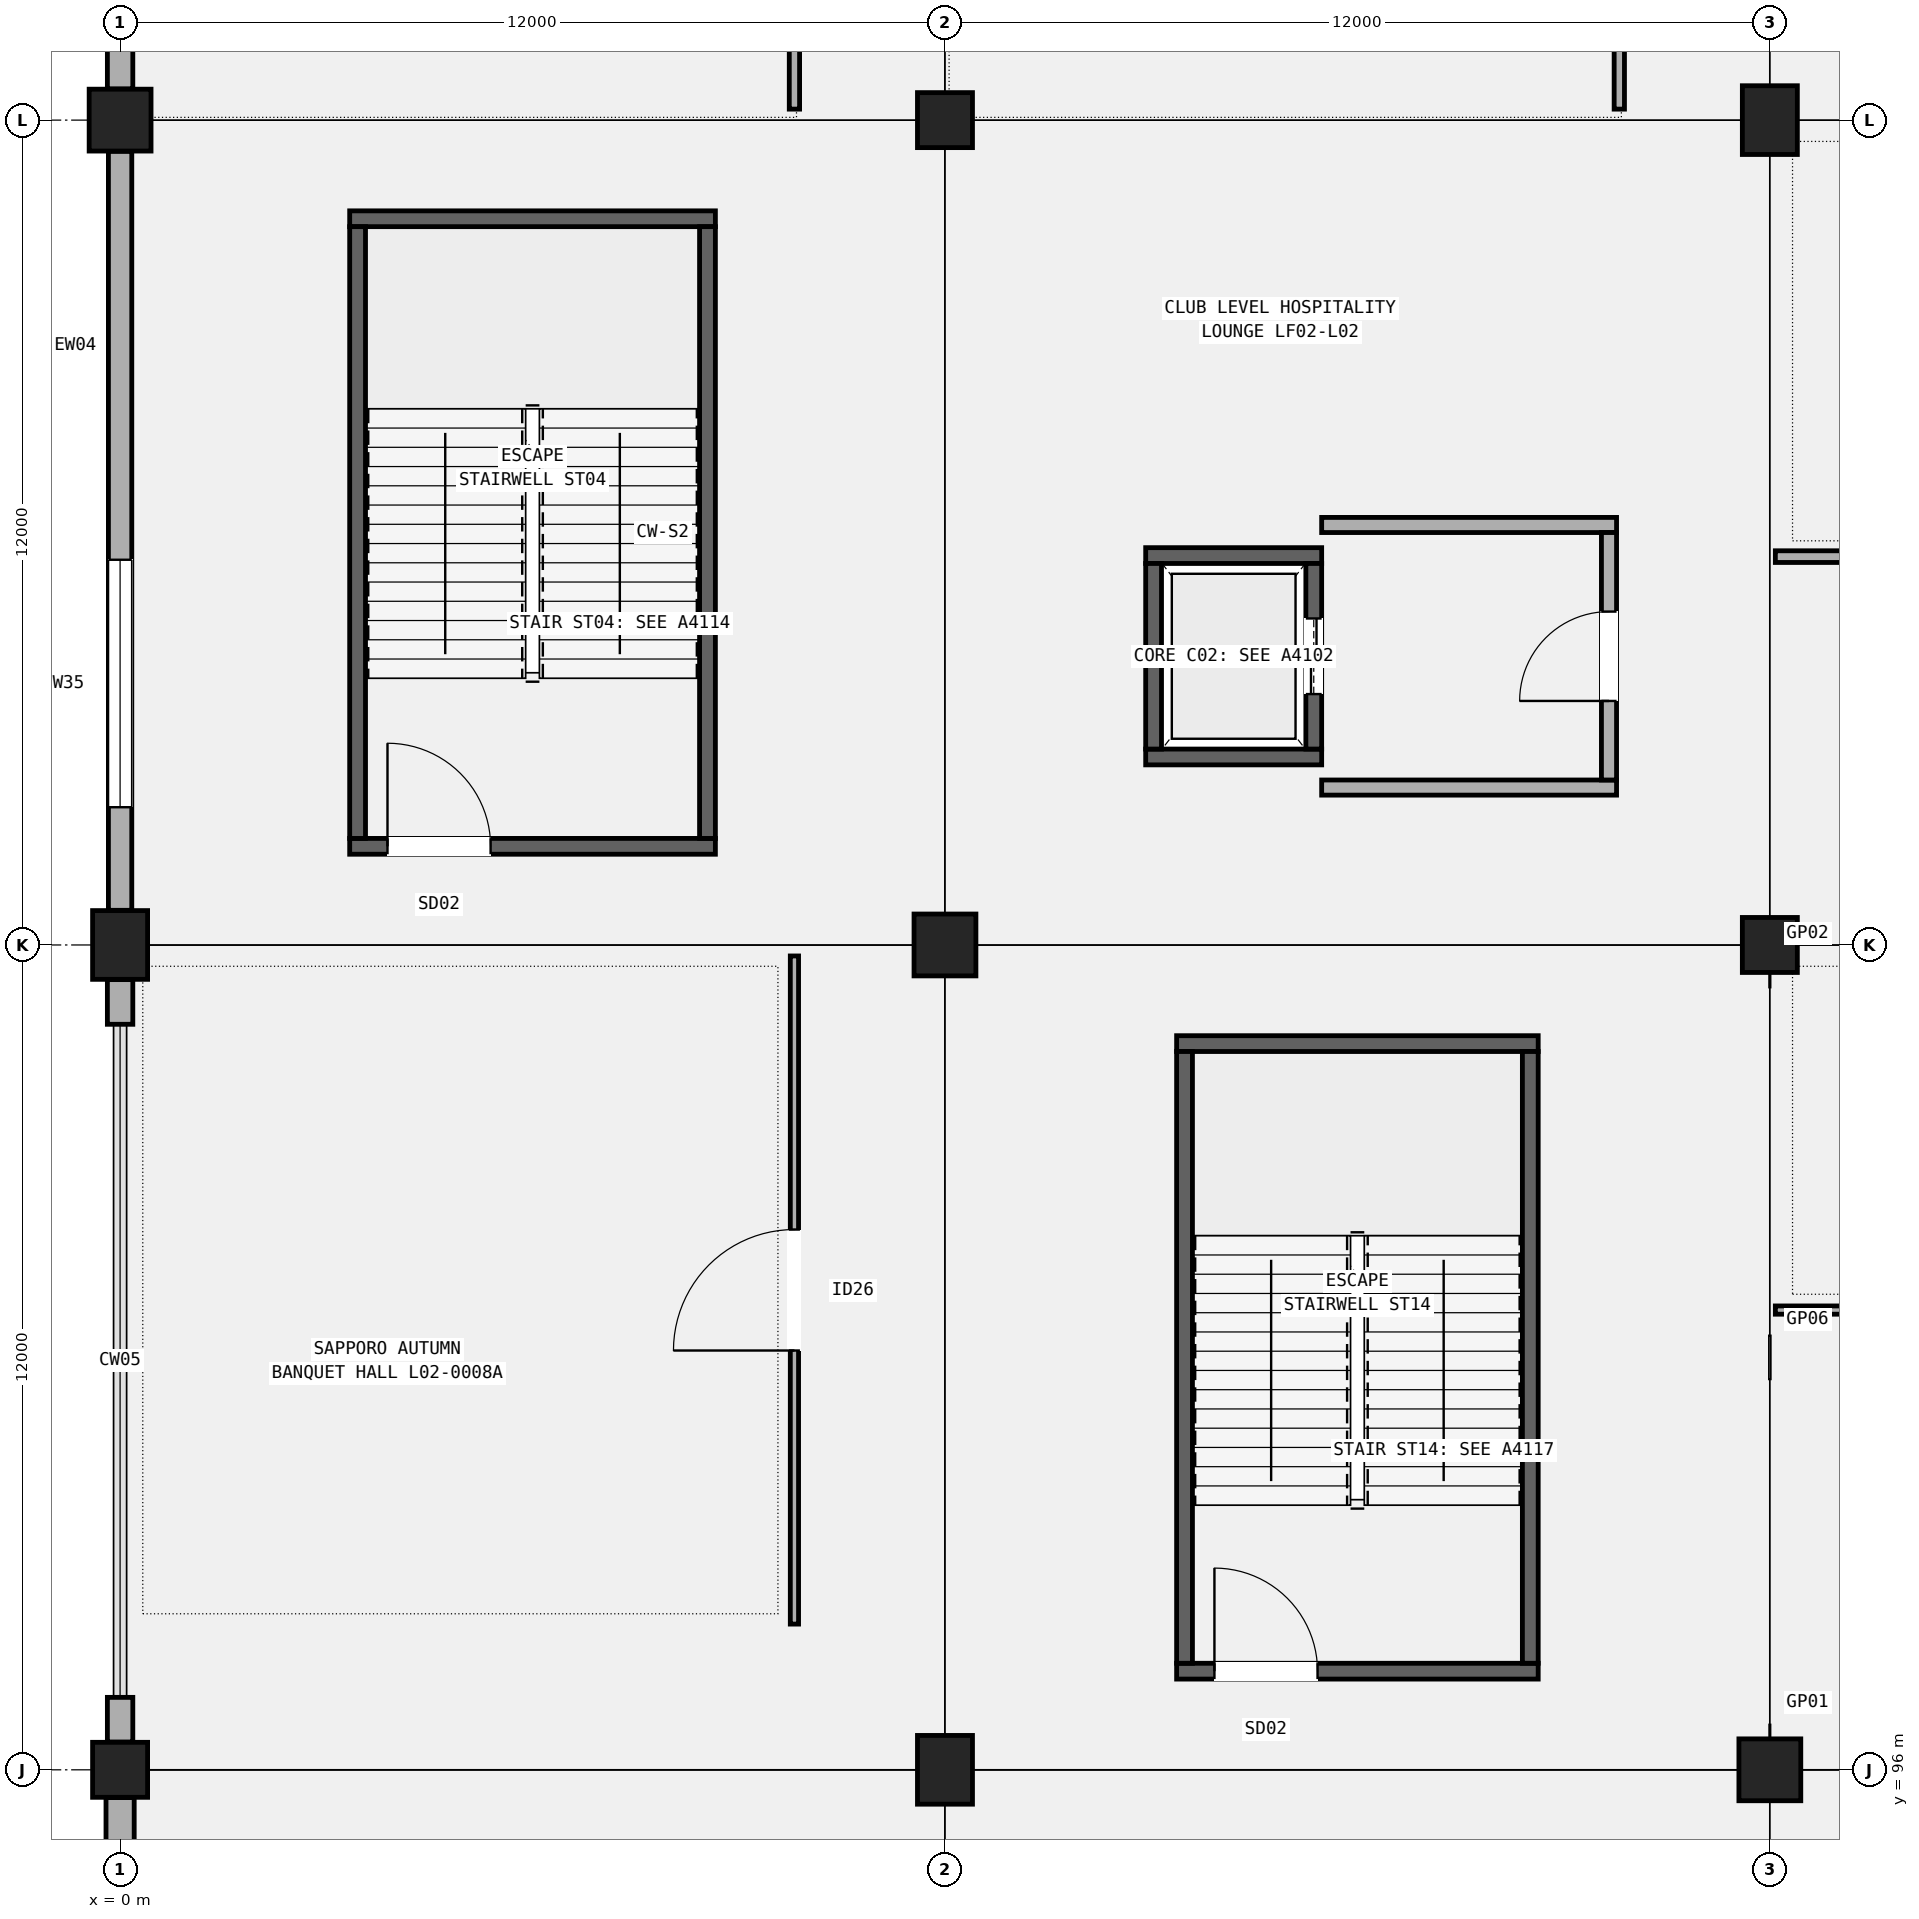
"""IFC4 building model, lengths in metres.
Left out: names, types, materials, properties, quantities, classifications, styles, units other than length and angle.
Written with IfcOpenShell. Run it as: python <this file> out.ifc"""

import sys

from ifc_helpers import new_model, si_unit, direction, frame, frame_2d, origin, origin_2d, place, context, subcontext, project, spatial, rectangle, extrude, element, fill, save


model = new_model("IFC4")
c1 = context("Model", 3, precision=1e-05, world=origin(), true_north=direction((0.0, 1.0)))
c2 = subcontext(c1, "Body", "Model", "MODEL_VIEW")
j1 = project(units=[si_unit("LENGTHUNIT", "METRE"), si_unit("PLANEANGLEUNIT", "RADIAN")], contexts=[c1])
p1 = place(None, origin())
s1 = spatial("IfcSite", under=j1, at=p1, CompositionType="ELEMENT")
p2 = place(p1, origin())
s2 = spatial("IfcBuilding", under=s1, at=p2, CompositionType="ELEMENT")
p3 = place(p2, frame((0.0, 0.0, 10.2)))
s3 = spatial("IfcBuildingStorey", under=s2, at=p3, CompositionType="ELEMENT", Elevation=10.2)
p4 = place(p3, frame((0.0, 96.0, 0.0), z_axis=(0.0, 0.0, 1.0), x_axis=(1.0, 0.0, 0.0)))
e1 = element("IfcColumn", 1, at=p4, inside=s3, PredefinedType="COLUMN", context=c2, shape_type="SweptSolid", body=[
    extrude(rectangle(XDim=0.8, YDim=0.8, at=origin_2d()), origin(), (0.0, 0.0, 1.0), 5.1),
])
p5 = place(p3, frame((0.0, 108.0, 0.0), z_axis=(0.0, 0.0, 1.0), x_axis=(1.0, 0.0, 0.0)))
e2 = element("IfcColumn", 2, at=p5, inside=s3, PredefinedType="COLUMN", context=c2, shape_type="SweptSolid", body=[
    extrude(rectangle(XDim=0.8, YDim=1.0, at=origin_2d()), origin(), (0.0, 0.0, 1.0), 5.1),
])
p6 = place(p3, frame((0.0, 120.0, 0.0), z_axis=(0.0, 0.0, 1.0), x_axis=(1.0, 0.0, 0.0)))
e3 = element("IfcColumn", 3, at=p6, inside=s3, PredefinedType="COLUMN", context=c2, shape_type="SweptSolid", body=[
    extrude(rectangle(XDim=0.9, YDim=0.9, at=origin_2d()), origin(), (0.0, 0.0, 1.0), 5.1),
])
p7 = place(p3, frame((12.0, 96.0, 0.0), z_axis=(0.0, 0.0, 1.0), x_axis=(1.0, 0.0, 0.0)))
e4 = element("IfcColumn", 4, at=p7, inside=s3, PredefinedType="COLUMN", context=c2, shape_type="SweptSolid", body=[
    extrude(rectangle(XDim=0.8, YDim=1.0, at=origin_2d()), origin(), (0.0, 0.0, 1.0), 5.1),
])
p8 = place(p3, frame((12.0, 108.0, 0.0), z_axis=(0.0, 0.0, 1.0), x_axis=(1.0, 0.0, 0.0)))
e5 = element("IfcColumn", 5, at=p8, inside=s3, PredefinedType="COLUMN", context=c2, shape_type="SweptSolid", body=[
    extrude(rectangle(XDim=0.9, YDim=0.9, at=origin_2d()), origin(), (0.0, 0.0, 1.0), 5.1),
])
p9 = place(p3, frame((12.0, 120.0, 0.0), z_axis=(0.0, 0.0, 1.0), x_axis=(1.0, 0.0, 0.0)))
e6 = element("IfcColumn", 6, at=p9, inside=s3, PredefinedType="COLUMN", context=c2, shape_type="SweptSolid", body=[
    extrude(rectangle(XDim=0.8, YDim=0.8, at=origin_2d()), origin(), (0.0, 0.0, 1.0), 5.1),
])
p10 = place(p3, frame((24.0, 96.0, 0.0), z_axis=(0.0, 0.0, 1.0), x_axis=(1.0, 0.0, 0.0)))
e7 = element("IfcColumn", 7, at=p10, inside=s3, PredefinedType="COLUMN", context=c2, shape_type="SweptSolid", body=[
    extrude(rectangle(XDim=0.9, YDim=0.9, at=origin_2d()), origin(), (0.0, 0.0, 1.0), 5.1),
])
p11 = place(p3, frame((24.0, 108.0, 0.0), z_axis=(0.0, 0.0, 1.0), x_axis=(1.0, 0.0, 0.0)))
e8 = element("IfcColumn", 8, at=p11, inside=s3, PredefinedType="COLUMN", context=c2, shape_type="SweptSolid", body=[
    extrude(rectangle(XDim=0.8, YDim=0.8, at=origin_2d()), origin(), (0.0, 0.0, 1.0), 5.1),
])
p12 = place(p3, frame((24.0, 120.0, 0.0), z_axis=(0.0, 0.0, 1.0), x_axis=(1.0, 0.0, 0.0)))
e9 = element("IfcColumn", 9, at=p12, inside=s3, PredefinedType="COLUMN", context=c2, shape_type="SweptSolid", body=[
    extrude(rectangle(XDim=0.8, YDim=1.0, at=origin_2d()), origin(), (0.0, 0.0, 1.0), 5.1),
])
p13 = place(p3, frame((0.0, 84.454, 0.0), z_axis=(0.0, 0.0, 1.0), x_axis=(0.0, 1.0, 0.0)))
e10 = element("IfcWall", 10, at=p13, inside=s3, PredefinedType="SOLIDWALL", context=c2, shape_type="SweptSolid", body=[
    extrude(rectangle(XDim=11.142, YDim=0.41, at=frame_2d((5.571, 0.0))), origin(), (0.0, 0.0, 1.0), 4.12),
])
p14 = place(p13, frame((2.75, 0.0, 0.95)))
e11 = element("IfcOpeningElement", 11, at=p14, cuts=e10, PredefinedType="OPENING", context=c2, shape_type="SweptSolid", body=[
    extrude(rectangle(XDim=3.3, YDim=2.25, at=frame_2d((1.65, 1.125))), frame((0.0, 0.215, 0.0), z_axis=(0.0, -1.0, 0.0), x_axis=(1.0, 0.0, 0.0)), (0.0, 0.0, 1.0), 0.43),
])
p15 = place(p3, frame((0.0, 96.404, 0.0), z_axis=(0.0, 0.0, 1.0), x_axis=(0.0, 1.0, 0.0)))
e12 = element("IfcWall", 12, at=p15, inside=s3, PredefinedType="SOLIDWALL", context=c2, shape_type="SweptSolid", body=[
    extrude(rectangle(XDim=0.65, YDim=0.37, at=frame_2d((0.325, 0.0))), origin(), (0.0, 0.0, 1.0), 4.232),
])
p16 = place(p3, frame((0.0, 106.846, 0.0), z_axis=(0.0, 0.0, 1.0), x_axis=(0.0, 1.0, 0.0)))
e13 = element("IfcWall", 13, at=p16, inside=s3, PredefinedType="SOLIDWALL", context=c2, shape_type="SweptSolid", body=[
    extrude(rectangle(XDim=0.65, YDim=0.37, at=frame_2d((0.325, 0.0))), origin(), (0.0, 0.0, 1.0), 4.232),
])
p17 = place(p3, frame((0.0, 108.504, 0.0), z_axis=(0.0, 0.0, 1.0), x_axis=(0.0, 1.0, 0.0)))
e14 = element("IfcWall", 14, at=p17, inside=s3, PredefinedType="SOLIDWALL", context=c2, shape_type="SweptSolid", body=[
    extrude(rectangle(XDim=11.042, YDim=0.34, at=frame_2d((5.521, 0.0))), origin(), (0.0, 0.0, 1.0), 4.02),
])
p18 = place(p17, frame((1.5, 0.0, 0.95)))
e15 = element("IfcOpeningElement", 15, at=p18, cuts=e14, PredefinedType="OPENING", context=c2, shape_type="SweptSolid", body=[
    extrude(rectangle(XDim=3.6, YDim=1.75, at=frame_2d((1.8, 0.875))), frame((0.0, 0.18, 0.0), z_axis=(0.0, -1.0, 0.0), x_axis=(1.0, 0.0, 0.0)), (0.0, 0.0, 1.0), 0.36),
])
p19 = place(p3, frame((0.0, 120.454, 0.0), z_axis=(0.0, 0.0, 1.0), x_axis=(0.0, 1.0, 0.0)))
e16 = element("IfcWall", 16, at=p19, inside=s3, PredefinedType="SOLIDWALL", context=c2, shape_type="SweptSolid", body=[
    extrude(rectangle(XDim=0.65, YDim=0.37, at=frame_2d((0.325, 0.0))), origin(), (0.0, 0.0, 1.0), 4.12),
])
p20 = place(p3, frame((3.34, 109.435, 0.0), z_axis=(0.0, 0.0, 1.0), x_axis=(1.0, 0.0, 0.0)))
e17 = element("IfcWall", 17, at=p20, inside=s3, PredefinedType="SHEAR", context=c2, shape_type="SweptSolid", body=[
    extrude(rectangle(XDim=5.32, YDim=0.23, at=frame_2d((2.66, 0.0))), origin(), (0.0, 0.0, 1.0), 4.82),
])
p21 = place(p20, frame((0.55, 0.0, 0.0)))
e18 = element("IfcOpeningElement", 18, at=p21, cuts=e17, PredefinedType="OPENING", context=c2, shape_type="SweptSolid", body=[
    extrude(rectangle(XDim=1.5, YDim=2.2, at=frame_2d((0.75, 1.1))), frame((0.0, 0.125, 0.0), z_axis=(0.0, -1.0, 0.0), x_axis=(1.0, 0.0, 0.0)), (0.0, 0.0, 1.0), 0.25),
])
p22 = place(p3, frame((3.34, 118.565, 0.0), z_axis=(0.0, 0.0, 1.0), x_axis=(1.0, 0.0, 0.0)))
e19 = element("IfcWall", 19, at=p22, inside=s3, PredefinedType="SHEAR", context=c2, shape_type="SweptSolid", body=[
    extrude(rectangle(XDim=5.32, YDim=0.23, at=frame_2d((2.66, 0.0))), origin(), (0.0, 0.0, 1.0), 4.82),
])
for number, where, z_axis, x_axis in (
    (20, (3.455, 109.55, 0.0), (0.0, 0.0, 1.0), (0.0, 1.0, 0.0)),
    (21, (8.545, 109.55, 0.0), (0.0, 0.0, 1.0), (0.0, 1.0, 0.0)),
):
    element("IfcWall", number, at=place(p3, frame(where, z_axis=z_axis, x_axis=x_axis)), inside=s3, PredefinedType="SHEAR", context=c2, shape_type="SweptSolid", body=[
        extrude(rectangle(XDim=8.9, YDim=0.23, at=frame_2d((4.45, 0.0))), origin(), (0.0, 0.0, 1.0), 4.82),
    ])
p23 = place(p3, frame((15.37, 97.435, 0.0), z_axis=(0.0, 0.0, 1.0), x_axis=(1.0, 0.0, 0.0)))
e22 = element("IfcWall", 22, at=p23, inside=s3, PredefinedType="SHEAR", context=c2, shape_type="SweptSolid", body=[
    extrude(rectangle(XDim=5.26, YDim=0.23, at=frame_2d((2.63, 0.0))), origin(), (0.0, 0.0, 1.0), 4.82),
])
p24 = place(p23, frame((0.55, 0.0, 0.0)))
e23 = element("IfcOpeningElement", 23, at=p24, cuts=e22, PredefinedType="OPENING", context=c2, shape_type="SweptSolid", body=[
    extrude(rectangle(XDim=1.5, YDim=2.2, at=frame_2d((0.75, 1.1))), frame((0.0, 0.125, 0.0), z_axis=(0.0, -1.0, 0.0), x_axis=(1.0, 0.0, 0.0)), (0.0, 0.0, 1.0), 0.25),
])
p25 = place(p3, frame((15.37, 106.565, 0.0), z_axis=(0.0, 0.0, 1.0), x_axis=(1.0, 0.0, 0.0)))
e24 = element("IfcWall", 24, at=p25, inside=s3, PredefinedType="SHEAR", context=c2, shape_type="SweptSolid", body=[
    extrude(rectangle(XDim=5.26, YDim=0.23, at=frame_2d((2.63, 0.0))), origin(), (0.0, 0.0, 1.0), 4.82),
])
for number, where, z_axis, x_axis in (
    (25, (15.485, 97.55, 0.0), (0.0, 0.0, 1.0), (0.0, 1.0, 0.0)),
    (26, (20.515, 97.55, 0.0), (0.0, 0.0, 1.0), (0.0, 1.0, 0.0)),
):
    element("IfcWall", number, at=place(p3, frame(where, z_axis=z_axis, x_axis=x_axis)), inside=s3, PredefinedType="SHEAR", context=c2, shape_type="SweptSolid", body=[
        extrude(rectangle(XDim=8.9, YDim=0.23, at=frame_2d((4.45, 0.0))), origin(), (0.0, 0.0, 1.0), 4.82),
    ])
for number, where, z_axis, x_axis in (
    (27, (14.92, 110.735, 0.0), (0.0, 0.0, 1.0), (1.0, 0.0, 0.0)),
    (28, (14.92, 113.665, 0.0), (0.0, 0.0, 1.0), (1.0, 0.0, 0.0)),
):
    element("IfcWall", number, at=place(p3, frame(where, z_axis=z_axis, x_axis=x_axis)), inside=s3, PredefinedType="SHEAR", context=c2, shape_type="SweptSolid", body=[
        extrude(rectangle(XDim=2.56, YDim=0.23, at=frame_2d((1.28, 0.0))), origin(), (0.0, 0.0, 1.0), 4.82),
    ])
p26 = place(p3, frame((15.035, 110.85, 0.0), z_axis=(0.0, 0.0, 1.0), x_axis=(0.0, 1.0, 0.0)))
e29 = element("IfcWall", 29, at=p26, inside=s3, PredefinedType="SHEAR", context=c2, shape_type="SweptSolid", body=[
    extrude(rectangle(XDim=2.7, YDim=0.23, at=frame_2d((1.35, 0.0))), origin(), (0.0, 0.0, 1.0), 4.82),
])
p27 = place(p3, frame((17.365, 110.85, 0.0), z_axis=(0.0, 0.0, 1.0), x_axis=(0.0, 1.0, 0.0)))
e30 = element("IfcWall", 30, at=p27, inside=s3, PredefinedType="SHEAR", context=c2, shape_type="SweptSolid", body=[
    extrude(rectangle(XDim=2.7, YDim=0.23, at=frame_2d((1.35, 0.0))), origin(), (0.0, 0.0, 1.0), 4.82),
])
p28 = place(p27, frame((0.8, 0.0, 0.0)))
e31 = element("IfcOpeningElement", 31, at=p28, cuts=e30, PredefinedType="OPENING", context=c2, shape_type="SweptSolid", body=[
    extrude(rectangle(XDim=1.1, YDim=2.15, at=frame_2d((0.55, 1.075))), frame((0.0, 0.125, 0.0), z_axis=(0.0, -1.0, 0.0), x_axis=(1.0, 0.0, 0.0)), (0.0, 0.0, 1.0), 0.25),
])
for number, where, z_axis, x_axis in (
    (32, (17.48, 110.29, 0.0), (0.0, 0.0, 1.0), (1.0, 0.0, 0.0)),
    (33, (17.48, 114.11, 0.0), (0.0, 0.0, 1.0), (1.0, 0.0, 0.0)),
):
    element("IfcWall", number, at=place(p3, frame(where, z_axis=z_axis, x_axis=x_axis)), inside=s3, PredefinedType="SOLIDWALL", context=c2, shape_type="SweptSolid", body=[
        extrude(rectangle(XDim=4.29, YDim=0.22, at=frame_2d((2.145, 0.0))), origin(), (0.0, 0.0, 1.0), 4.22),
    ])
p29 = place(p3, frame((21.66, 110.4, 0.0), z_axis=(0.0, 0.0, 1.0), x_axis=(0.0, 1.0, 0.0)))
e34 = element("IfcWall", 34, at=p29, inside=s3, PredefinedType="SOLIDWALL", context=c2, shape_type="SweptSolid", body=[
    extrude(rectangle(XDim=3.6, YDim=0.22, at=frame_2d((1.8, 0.0))), origin(), (0.0, 0.0, 1.0), 4.22),
])
p30 = place(p29, frame((1.15, 0.0, 0.0)))
e35 = element("IfcOpeningElement", 35, at=p30, cuts=e34, PredefinedType="OPENING", context=c2, shape_type="SweptSolid", body=[
    extrude(rectangle(XDim=1.3, YDim=2.15, at=frame_2d((0.65, 1.075))), frame((0.0, 0.12, 0.0), z_axis=(0.0, -1.0, 0.0), x_axis=(1.0, 0.0, 0.0)), (0.0, 0.0, 1.0), 0.24),
])
p31 = place(p3, frame((9.81, 98.12, 0.0), z_axis=(0.0, 0.0, 1.0), x_axis=(0.0, 1.0, 0.0)))
e36 = element("IfcWall", 36, at=p31, inside=s3, PredefinedType="PARTITIONING", context=c2, shape_type="SweptSolid", body=[
    extrude(rectangle(XDim=9.72, YDim=0.12, at=frame_2d((4.86, 0.0))), origin(), (0.0, 0.0, 1.0), 4.22),
])
p32 = place(p31, frame((3.98, 0.0, 0.0)))
e37 = element("IfcOpeningElement", 37, at=p32, cuts=e36, PredefinedType="OPENING", context=c2, shape_type="SweptSolid", body=[
    extrude(rectangle(XDim=1.76, YDim=2.3, at=frame_2d((0.88, 1.15))), frame((0.0, 0.07, 0.0), z_axis=(0.0, -1.0, 0.0), x_axis=(1.0, 0.0, 0.0)), (0.0, 0.0, 1.0), 0.14),
])
p33 = place(p3, frame((9.81, 120.16, 0.0), z_axis=(0.0, 0.0, 1.0), x_axis=(0.0, 1.0, 0.0)))
e38 = element("IfcWall", 38, at=p33, inside=s3, PredefinedType="PARTITIONING", context=c2, shape_type="SweptSolid", body=[
    extrude(rectangle(XDim=11.68, YDim=0.15, at=frame_2d((5.84, 0.0))), origin(), (0.0, 0.0, 1.0), 4.22),
])
p34 = place(p33, frame((5.39, 0.0, 0.0)))
e39 = element("IfcOpeningElement", 39, at=p34, cuts=e38, PredefinedType="OPENING", context=c2, shape_type="SweptSolid", body=[
    extrude(rectangle(XDim=0.9, YDim=2.06, at=frame_2d((0.45, 1.03))), frame((0.0, 0.085, 0.0), z_axis=(0.0, -1.0, 0.0), x_axis=(1.0, 0.0, 0.0)), (0.0, 0.0, 1.0), 0.17),
])
p35 = place(p3, frame((21.81, 120.16, 0.0), z_axis=(0.0, 0.0, 1.0), x_axis=(0.0, 1.0, 0.0)))
e40 = element("IfcWall", 40, at=p35, inside=s3, PredefinedType="PARTITIONING", context=c2, shape_type="SweptSolid", body=[
    extrude(rectangle(XDim=11.68, YDim=0.15, at=frame_2d((5.84, 0.0))), origin(), (0.0, 0.0, 1.0), 4.22),
])
p36 = place(p35, frame((5.35, 0.0, 0.0)))
e41 = element("IfcOpeningElement", 41, at=p36, cuts=e40, PredefinedType="OPENING", context=c2, shape_type="SweptSolid", body=[
    extrude(rectangle(XDim=0.98, YDim=2.1, at=frame_2d((0.49, 1.05))), frame((0.0, 0.085, 0.0), z_axis=(0.0, -1.0, 0.0), x_axis=(1.0, 0.0, 0.0)), (0.0, 0.0, 1.0), 0.17),
])
p37 = place(p3, frame((24.08, 102.688, 0.0), z_axis=(0.0, 0.0, 1.0), x_axis=(1.0, 0.0, 0.0)))
e42 = element("IfcWall", 42, at=p37, inside=s3, PredefinedType="PARTITIONING", context=c2, shape_type="SweptSolid", body=[
    extrude(rectangle(XDim=10.17, YDim=0.12, at=frame_2d((5.085, 0.0))), origin(), (0.0, 0.0, 1.0), 4.22),
])
p38 = place(p3, frame((24.08, 113.65, 0.0), z_axis=(0.0, 0.0, 1.0), x_axis=(1.0, 0.0, 0.0)))
e43 = element("IfcWall", 43, at=p38, inside=s3, PredefinedType="PARTITIONING", context=c2, shape_type="SweptSolid", body=[
    extrude(rectangle(XDim=10.15, YDim=0.17, at=frame_2d((5.075, 0.0))), origin(), (0.0, 0.0, 1.0), 4.22),
])
p39 = place(p18, origin())
e44 = element("IfcWindow", 44, at=p39, inside=s3, PartitioningType="SINGLE_PANEL", PredefinedType="WINDOW", context=c2, shape_type="SweptSolid", body=[
    extrude(rectangle(XDim=3.6, YDim=1.75, at=frame_2d((1.8, 0.875))), frame((0.0, 0.03, 0.0), z_axis=(0.0, -1.0, 0.0), x_axis=(1.0, 0.0, 0.0)), (0.0, 0.0, 1.0), 0.06),
])
fill(e15, e44)
p40 = place(p21, origin())
e45 = element("IfcDoor", 45, at=p40, inside=s3, OperationType="SINGLE_SWING_LEFT", PredefinedType="DOOR", context=c2, shape_type="SweptSolid", body=[
    extrude(rectangle(XDim=1.5, YDim=2.2, at=frame_2d((0.75, 1.1))), frame((0.0, 0.025, 0.0), z_axis=(0.0, -1.0, 0.0), x_axis=(1.0, 0.0, 0.0)), (0.0, 0.0, 1.0), 0.05),
])
fill(e18, e45)
p41 = place(p24, origin())
e46 = element("IfcDoor", 46, at=p41, inside=s3, OperationType="SINGLE_SWING_LEFT", PredefinedType="DOOR", context=c2, shape_type="SweptSolid", body=[
    extrude(rectangle(XDim=1.5, YDim=2.2, at=frame_2d((0.75, 1.1))), frame((0.0, 0.025, 0.0), z_axis=(0.0, -1.0, 0.0), x_axis=(1.0, 0.0, 0.0)), (0.0, 0.0, 1.0), 0.05),
])
fill(e23, e46)
p42 = place(p28, origin())
e47 = element("IfcDoor", 47, at=p42, inside=s3, OperationType="DOUBLE_DOOR_SLIDING", PredefinedType="DOOR", context=c2, shape_type="SweptSolid", body=[
    extrude(rectangle(XDim=1.1, YDim=2.15, at=frame_2d((0.55, 1.075))), frame((0.0, 0.025, 0.0), z_axis=(0.0, -1.0, 0.0), x_axis=(1.0, 0.0, 0.0)), (0.0, 0.0, 1.0), 0.05),
])
fill(e31, e47)
p43 = place(p30, origin())
e48 = element("IfcDoor", 48, at=p43, inside=s3, OperationType="SINGLE_SWING_LEFT", PredefinedType="DOOR", context=c2, shape_type="SweptSolid", body=[
    extrude(rectangle(XDim=1.3, YDim=2.15, at=frame_2d((0.65, 1.075))), frame((0.0, 0.025, 0.0), z_axis=(0.0, -1.0, 0.0), x_axis=(1.0, 0.0, 0.0)), (0.0, 0.0, 1.0), 0.05),
])
fill(e35, e48)
p44 = place(p32, origin())
e49 = element("IfcDoor", 49, at=p44, inside=s3, OperationType="SINGLE_SWING_LEFT", PredefinedType="DOOR", context=c2, shape_type="SweptSolid", body=[
    extrude(rectangle(XDim=1.76, YDim=2.3, at=frame_2d((0.88, 1.15))), frame((0.0, 0.025, 0.0), z_axis=(0.0, -1.0, 0.0), x_axis=(1.0, 0.0, 0.0)), (0.0, 0.0, 1.0), 0.05),
])
fill(e37, e49)
save(model, sys.argv[1])
